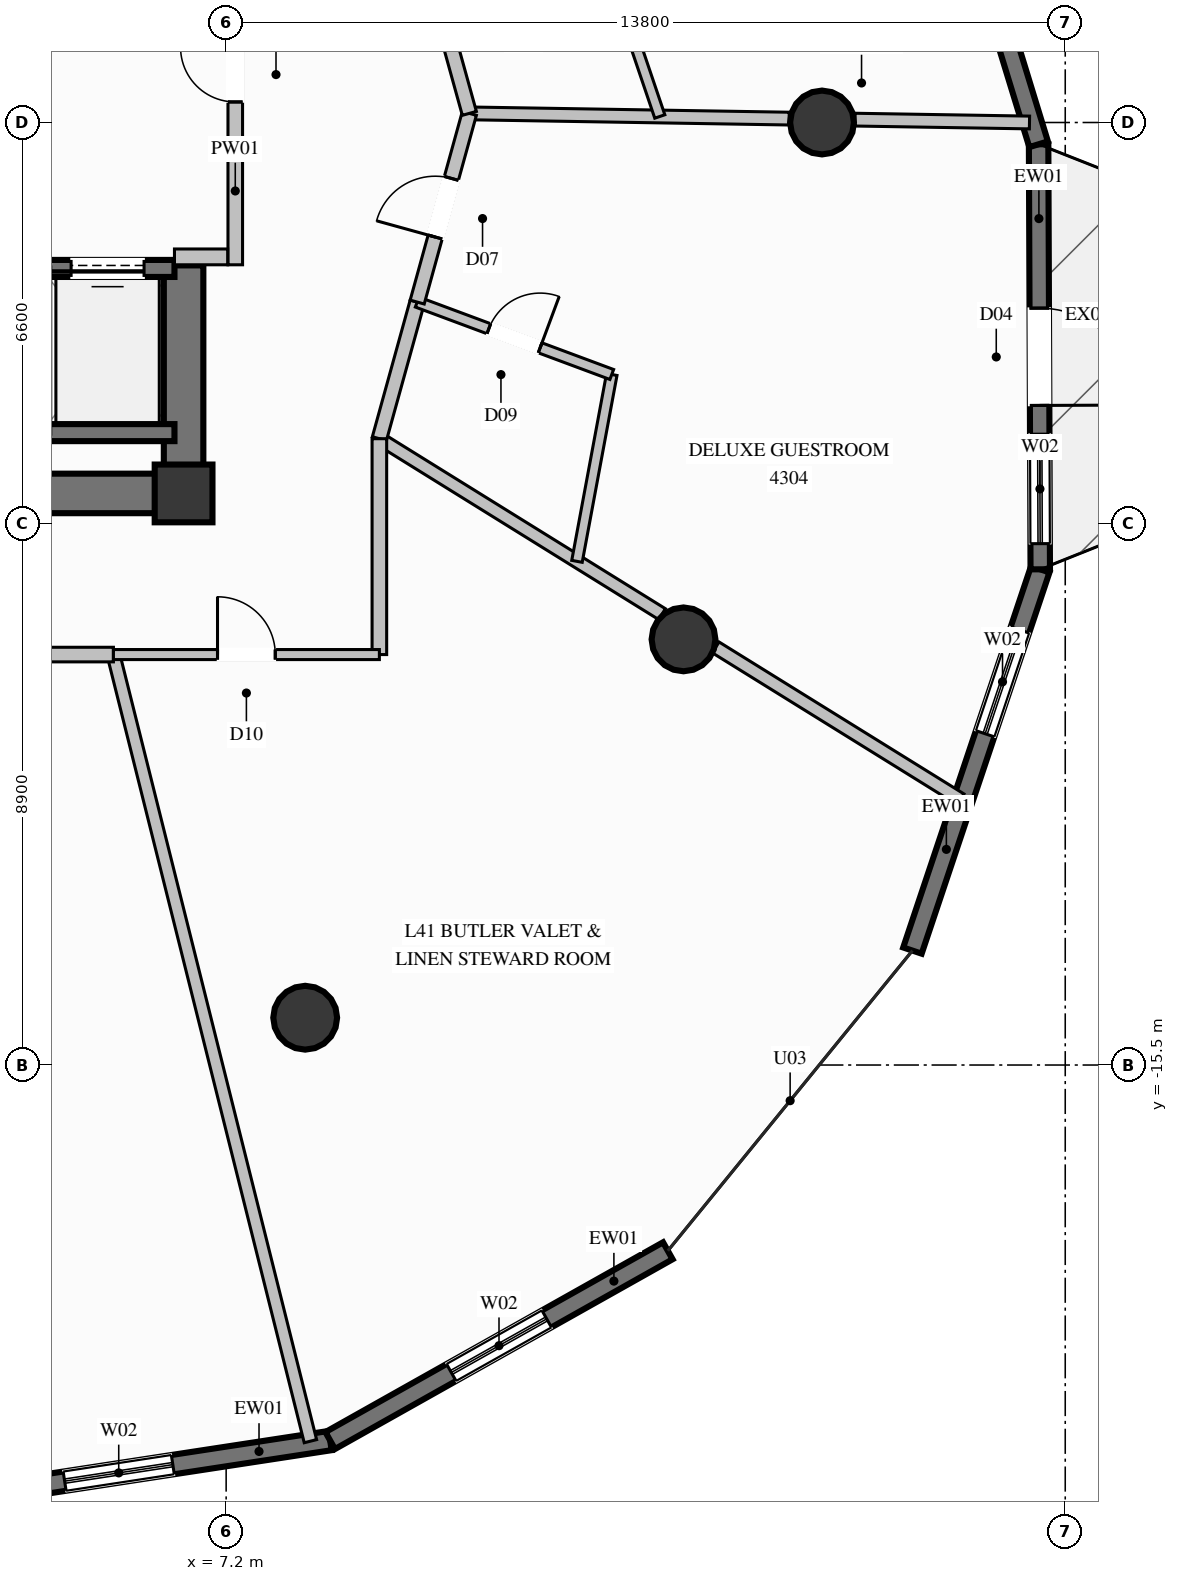
"""IFC4 building model, lengths in metres.
Left out: names, types, materials, properties, quantities, classifications, styles, units other than length and angle.
Written with IfcOpenShell. Run it as: python <this file> out.ifc"""

import sys

from ifc_helpers import new_model, si_unit, direction, frame, frame_2d, origin, origin_2d, place, context, subcontext, project, spatial, rectangle, circle, extrude, element, fill, save


model = new_model("IFC4")
c1 = context("Model", 3, precision=1e-05, world=origin(), true_north=direction((0.0, 1.0)))
c2 = subcontext(c1, "Body", "Model", "MODEL_VIEW")
j1 = project(units=[si_unit("LENGTHUNIT", "METRE"), si_unit("PLANEANGLEUNIT", "RADIAN")], contexts=[c1])
p1 = place(None, origin())
s1 = spatial("IfcSite", under=j1, at=p1, CompositionType="ELEMENT")
p2 = place(p1, origin())
s2 = spatial("IfcBuilding", under=s1, at=p2, CompositionType="ELEMENT")
p3 = place(p2, frame((0.0, 0.0, 160.2)))
s3 = spatial("IfcBuildingStorey", under=s2, at=p3, CompositionType="ELEMENT", Elevation=160.2)
p4 = place(p3, frame((6.5, -6.1, 0.0), z_axis=(0.0, 0.0, 1.0), x_axis=(1.0, 0.0, 0.0)))
e1 = element("IfcColumn", 1, at=p4, inside=s3, PredefinedType="COLUMN", context=c2, shape_type="SweptSolid", body=[
    extrude(rectangle(XDim=0.95, YDim=0.95, at=origin_2d()), origin(), (0.0, 0.0, 1.0), 3.6),
])
p5 = place(p3, frame((4.15, -6.1, 0.0), z_axis=(0.0, 0.0, 1.0), x_axis=(1.0, 0.0, 0.0)))
e2 = element("IfcWall", 2, at=p5, inside=s3, PredefinedType="SHEAR", context=c2, shape_type="SweptSolid", body=[
    extrude(rectangle(XDim=2.025, YDim=0.65, at=frame_2d((1.013, 0.0))), origin(), (0.0, 0.0, 1.0), 3.6),
])
p6 = place(p3, frame((6.5, -6.425, 0.0), z_axis=(0.0, 0.0, 1.0), x_axis=(0.0, 1.0, 0.0)))
e3 = element("IfcWall", 3, at=p6, inside=s3, PredefinedType="SHEAR", context=c2, shape_type="SweptSolid", body=[
    extrude(rectangle(XDim=4.075, YDim=0.65, at=frame_2d((2.038, 0.0))), origin(), (0.0, 0.0, 1.0), 3.6),
])
for number, where, z_axis, x_axis in (
    (4, (17.0, 0.0, 0.0), (0.0, 0.0, 1.0), (1.0, 0.0, 0.0)),
    (5, (8.5, -14.722, 0.0), (0.0, 0.0, 1.0), (1.0, 0.0, 0.0)),
    (6, (14.722, -8.5, 0.0), (0.0, 0.0, 1.0), (1.0, 0.0, 0.0)),
):
    element("IfcColumn", number, at=place(p3, frame(where, z_axis=z_axis, x_axis=x_axis)), inside=s3, PredefinedType="COLUMN", context=c2, shape_type="SweptSolid", body=[
        extrude(circle(Radius=0.525, at=origin_2d()), origin(), (0.0, 0.0, 1.0), 3.6),
    ])
p7 = place(p3, frame((20.589, -7.348, 0.0), z_axis=(0.0, 0.0, 1.0), x_axis=(-0.317866465999, -0.948135491264, 0.0)))
e7 = element("IfcWall", 7, at=p7, inside=s3, PredefinedType="SOLIDWALL", context=c2, shape_type="SweptSolid", body=[
    extrude(rectangle(XDim=6.613, YDim=0.32, at=frame_2d((3.307, 0.0))), origin(), (0.0, 0.0, 1.0), 3.2),
])
p8 = place(p7, frame((1.052, 0.0, 0.35)))
e8 = element("IfcOpeningElement", 8, at=p8, cuts=e7, PredefinedType="OPENING", context=c2, shape_type="SweptSolid", body=[
    extrude(rectangle(XDim=1.8, YDim=2.6, at=frame_2d((0.9, 1.3))), frame((0.0, 0.17, 0.0), z_axis=(0.0, -1.0, 0.0), x_axis=(1.0, 0.0, 0.0)), (0.0, 0.0, 1.0), 0.34),
])
p9 = place(p3, frame((20.562, -0.358, 0.0), z_axis=(0.0, 0.0, 1.0), x_axis=(0.003876887493, -0.999992484843, 0.0)))
e9 = element("IfcWall", 9, at=p9, inside=s3, PredefinedType="SOLIDWALL", context=c2, shape_type="SweptSolid", body=[
    extrude(rectangle(XDim=6.99, YDim=0.32, at=frame_2d((3.495, 0.0))), origin(), (0.0, 0.0, 1.0), 3.2),
])
p10 = place(p9, frame((4.768, 0.0, 0.35)))
e10 = element("IfcOpeningElement", 10, at=p10, cuts=e9, PredefinedType="OPENING", context=c2, shape_type="SweptSolid", body=[
    extrude(rectangle(XDim=1.8, YDim=2.6, at=frame_2d((0.9, 1.3))), frame((0.0, 0.17, 0.0), z_axis=(0.0, -1.0, 0.0), x_axis=(1.0, 0.0, 0.0)), (0.0, 0.0, 1.0), 0.34),
])
p11 = place(p9, frame((2.695, 0.0, 0.0)))
e11 = element("IfcOpeningElement", 11, at=p11, cuts=e9, PredefinedType="OPENING", context=c2, shape_type="SweptSolid", body=[
    extrude(rectangle(XDim=1.6, YDim=2.3, at=frame_2d((0.8, 1.15))), frame((0.0, 0.17, 0.0), z_axis=(0.0, -1.0, 0.0), x_axis=(1.0, 0.0, 0.0)), (0.0, 0.0, 1.0), 0.34),
])
p12 = place(p3, frame((18.411, 6.666, 0.0), z_axis=(0.0, 0.0, 1.0), x_axis=(0.292831477481, -0.956164068451, 0.0)))
e12 = element("IfcWall", 12, at=p12, inside=s3, PredefinedType="SOLIDWALL", context=c2, shape_type="SweptSolid", body=[
    extrude(rectangle(XDim=7.346, YDim=0.32, at=frame_2d((3.673, 0.0))), origin(), (0.0, 0.0, 1.0), 3.2),
])
p13 = place(p12, frame((2.53, 0.0, 0.35)))
e13 = element("IfcOpeningElement", 13, at=p13, cuts=e12, PredefinedType="OPENING", context=c2, shape_type="SweptSolid", body=[
    extrude(rectangle(XDim=1.8, YDim=2.6, at=frame_2d((0.9, 1.3))), frame((0.0, 0.17, 0.0), z_axis=(0.0, -1.0, 0.0), x_axis=(1.0, 0.0, 0.0)), (0.0, 0.0, 1.0), 0.34),
])
p14 = place(p3, frame((8.911, -21.676, 0.0), z_axis=(0.0, 0.0, 1.0), x_axis=(-0.988522302644, -0.151075005132, 0.0)))
e14 = element("IfcWall", 14, at=p14, inside=s3, PredefinedType="SOLIDWALL", context=c2, shape_type="SweptSolid", body=[
    extrude(rectangle(XDim=6.613, YDim=0.32, at=frame_2d((3.306, 0.0))), origin(), (0.0, 0.0, 1.0), 3.2),
])
p15 = place(p14, frame((2.618, 0.0, 0.35)))
e15 = element("IfcOpeningElement", 15, at=p15, cuts=e14, PredefinedType="OPENING", context=c2, shape_type="SweptSolid", body=[
    extrude(rectangle(XDim=1.8, YDim=2.6, at=frame_2d((0.9, 1.3))), frame((0.0, 0.17, 0.0), z_axis=(0.0, -1.0, 0.0), x_axis=(1.0, 0.0, 0.0)), (0.0, 0.0, 1.0), 0.34),
])
p16 = place(p3, frame((14.464, -18.555, 0.0), z_axis=(0.0, 0.0, 1.0), x_axis=(-0.871749481809, -0.489951876174, 0.0)))
e16 = element("IfcWall", 16, at=p16, inside=s3, PredefinedType="SOLIDWALL", context=c2, shape_type="SweptSolid", body=[
    extrude(rectangle(XDim=6.37, YDim=0.32, at=frame_2d((3.185, 0.0))), origin(), (0.0, 0.0, 1.0), 3.2),
])
p17 = place(p16, frame((2.285, 0.0, 0.35)))
e17 = element("IfcOpeningElement", 17, at=p17, cuts=e16, PredefinedType="OPENING", context=c2, shape_type="SweptSolid", body=[
    extrude(rectangle(XDim=1.8, YDim=2.6, at=frame_2d((0.9, 1.3))), frame((0.0, 0.17, 0.0), z_axis=(0.0, -1.0, 0.0), x_axis=(1.0, 0.0, 0.0)), (0.0, 0.0, 1.0), 0.34),
])
p18 = place(p3, frame((4.15, -5.1, 0.0), z_axis=(0.0, 0.0, 1.0), x_axis=(1.0, 0.0, 0.0)))
e18 = element("IfcWall", 18, at=p18, inside=s3, PredefinedType="SOLIDWALL", context=c2, shape_type="SweptSolid", body=[
    extrude(rectangle(XDim=2.2, YDim=0.28, at=frame_2d((1.1, 0.0))), origin(), (0.0, 0.0, 1.0), 3.2),
])
p19 = place(p3, frame((6.35, -2.4, 0.0), z_axis=(0.0, 0.0, 1.0), x_axis=(-1.0, 0.0, 0.0)))
e19 = element("IfcWall", 19, at=p19, inside=s3, PredefinedType="SOLIDWALL", context=c2, shape_type="SweptSolid", body=[
    extrude(rectangle(XDim=2.2, YDim=0.28, at=frame_2d((1.1, 0.0))), origin(), (0.0, 0.0, 1.0), 3.2),
])
p20 = place(p19, frame((0.5, 0.0, 0.0)))
e20 = element("IfcOpeningElement", 20, at=p20, cuts=e19, PredefinedType="OPENING", context=c2, shape_type="SweptSolid", body=[
    extrude(rectangle(XDim=1.2, YDim=2.2, at=frame_2d((0.6, 1.1))), frame((0.0, 0.15, 0.0), z_axis=(0.0, -1.0, 0.0), x_axis=(1.0, 0.0, 0.0)), (0.0, 0.0, 1.0), 0.3),
])
p21 = place(p3, frame((7.35, -2.34, 0.0), z_axis=(0.0, 0.0, 1.0), x_axis=(0.0, 1.0, 0.0)))
e21 = element("IfcWall", 21, at=p21, inside=s3, PredefinedType="PARTITIONING", context=c2, shape_type="SweptSolid", body=[
    extrude(rectangle(XDim=5.02, YDim=0.24, at=frame_2d((2.51, 0.0))), origin(), (0.0, 0.0, 1.0), 3.2),
])
p22 = place(p21, frame((2.678, 0.0, 0.0)))
e22 = element("IfcOpeningElement", 22, at=p22, cuts=e21, PredefinedType="OPENING", context=c2, shape_type="SweptSolid", body=[
    extrude(rectangle(XDim=0.9, YDim=2.02, at=frame_2d((0.45, 1.01))), frame((0.0, 0.13, 0.0), z_axis=(0.0, -1.0, 0.0), x_axis=(1.0, 0.0, 0.0)), (0.0, 0.0, 1.0), 0.26),
])
p23 = place(p3, frame((6.35, -2.21, 0.0), z_axis=(0.0, 0.0, 1.0), x_axis=(1.0, 0.0, 0.0)))
e23 = element("IfcWall", 23, at=p23, inside=s3, PredefinedType="PARTITIONING", context=c2, shape_type="SweptSolid", body=[
    extrude(rectangle(XDim=0.875, YDim=0.26, at=frame_2d((0.438, 0.0))), origin(), (0.0, 0.0, 1.0), 3.2),
])
p24 = place(p3, frame((11.2, 0.15, 0.0), z_axis=(0.0, 0.0, 1.0), x_axis=(0.999866513716, -0.016338749957, 0.0)))
e24 = element("IfcWall", 24, at=p24, inside=s3, PredefinedType="PARTITIONING", context=c2, shape_type="SweptSolid", body=[
    extrude(rectangle(XDim=5.26, YDim=0.21, at=frame_2d((2.63, 0.0))), origin(), (0.0, 0.0, 1.0), 2.067),
])
p25 = place(p3, frame((17.543, 0.047, 0.0), z_axis=(0.0, 0.0, 1.0), x_axis=(0.999865174134, -0.016420522346, 0.0)))
e25 = element("IfcWall", 25, at=p25, inside=s3, PredefinedType="PARTITIONING", context=c2, shape_type="SweptSolid", body=[
    extrude(rectangle(XDim=2.87, YDim=0.21, at=frame_2d((1.435, 0.0))), origin(), (0.0, 0.0, 1.0), 3.2),
])
p26 = place(p3, frame((9.72, -5.2, 0.0), z_axis=(0.0, 0.0, 1.0), x_axis=(0.849683597514, -0.527292882671, 0.0)))
e26 = element("IfcWall", 26, at=p26, inside=s3, PredefinedType="PARTITIONING", context=c2, shape_type="SweptSolid", body=[
    extrude(rectangle(XDim=5.471, YDim=0.21, at=frame_2d((2.736, 0.0))), origin(), (0.0, 0.0, 1.0), 2.067),
])
p27 = place(p3, frame((15.251, -8.632, 0.0), z_axis=(0.0, 0.0, 1.0), x_axis=(0.849749962153, -0.527185927184, 0.0)))
e27 = element("IfcWall", 27, at=p27, inside=s3, PredefinedType="PARTITIONING", context=c2, shape_type="SweptSolid", body=[
    extrude(rectangle(XDim=4.74, YDim=0.21, at=frame_2d((2.37, 0.0))), origin(), (0.0, 0.0, 1.0), 3.2),
])
p28 = place(p3, frame((9.72, -5.2, 0.0), z_axis=(0.0, 0.0, 1.0), x_axis=(0.266801280383, 0.963751563831, 0.0)))
e28 = element("IfcWall", 28, at=p28, inside=s3, PredefinedType="PARTITIONING", context=c2, shape_type="SweptSolid", body=[
    extrude(rectangle(XDim=2.332, YDim=0.24, at=frame_2d((1.166, 0.0))), origin(), (0.0, 0.0, 1.0), 3.2),
])
p29 = place(p3, frame((12.97, -7.217, 0.0), z_axis=(0.0, 0.0, 1.0), x_axis=(0.183000964093, 0.983112733689, 0.0)))
e29 = element("IfcWall", 29, at=p29, inside=s3, PredefinedType="PLUMBINGWALL", context=c2, shape_type="SweptSolid", body=[
    extrude(rectangle(XDim=3.126, YDim=0.175, at=frame_2d((1.563, 0.0))), origin(), (0.0, 0.0, 1.0), 3.2),
])
p30 = place(p3, frame((10.342, -2.953, 0.0), z_axis=(0.0, 0.0, 1.0), x_axis=(0.937175646821, -0.348857860749, 0.0)))
e30 = element("IfcWall", 30, at=p30, inside=s3, PredefinedType="PLUMBINGWALL", context=c2, shape_type="SweptSolid", body=[
    extrude(rectangle(XDim=3.415, YDim=0.175, at=frame_2d((1.707, 0.0))), origin(), (0.0, 0.0, 1.0), 3.2),
])
p31 = place(p30, frame((1.257, 0.0, 0.0)))
e31 = element("IfcOpeningElement", 31, at=p31, cuts=e30, PredefinedType="OPENING", context=c2, shape_type="SweptSolid", body=[
    extrude(rectangle(XDim=0.9, YDim=2.1, at=frame_2d((0.45, 1.05))), frame((0.0, 0.098, 0.0), z_axis=(0.0, -1.0, 0.0), x_axis=(1.0, 0.0, 0.0)), (0.0, 0.0, 1.0), 0.195),
])
p32 = place(p3, frame((10.342, -2.953, 0.0), z_axis=(0.0, 0.0, 1.0), x_axis=(0.266497617314, 0.963835577246, 0.0)))
e32 = element("IfcWall", 32, at=p32, inside=s3, PredefinedType="PARTITIONING", context=c2, shape_type="SweptSolid", body=[
    extrude(rectangle(XDim=3.219, YDim=0.24, at=frame_2d((1.61, 0.0))), origin(), (0.0, 0.0, 1.0), 3.2),
])
p33 = place(p32, frame((1.11, 0.0, 0.0)))
e33 = element("IfcOpeningElement", 33, at=p33, cuts=e32, PredefinedType="OPENING", context=c2, shape_type="SweptSolid", body=[
    extrude(rectangle(XDim=1.0, YDim=2.2, at=frame_2d((0.5, 1.1))), frame((0.0, 0.13, 0.0), z_axis=(0.0, -1.0, 0.0), x_axis=(1.0, 0.0, 0.0)), (0.0, 0.0, 1.0), 0.26),
])
p34 = place(p3, frame((11.2, 0.15, 0.0), z_axis=(0.0, 0.0, 1.0), x_axis=(-0.266801280383, 0.963751563831, 0.0)))
e34 = element("IfcWall", 34, at=p34, inside=s3, PredefinedType="PARTITIONING", context=c2, shape_type="SweptSolid", body=[
    extrude(rectangle(XDim=2.332, YDim=0.24, at=frame_2d((1.166, 0.0))), origin(), (0.0, 0.0, 1.0), 3.2),
])
p35 = place(p3, frame((14.332, 0.099, 0.0), z_axis=(0.0, 0.0, 1.0), x_axis=(-0.32114672857, 0.947029449769, 0.0)))
e35 = element("IfcWall", 35, at=p35, inside=s3, PredefinedType="PLUMBINGWALL", context=c2, shape_type="SweptSolid", body=[
    extrude(rectangle(XDim=3.005, YDim=0.175, at=frame_2d((1.502, 0.0))), origin(), (0.0, 0.0, 1.0), 3.2),
])
p36 = place(p3, frame((5.346, -8.75, 0.0), z_axis=(0.0, 0.0, 1.0), x_axis=(0.242957749605, -0.970036871416, 0.0)))
e36 = element("IfcWall", 36, at=p36, inside=s3, PredefinedType="PARTITIONING", context=c2, shape_type="SweptSolid", body=[
    extrude(rectangle(XDim=13.336, YDim=0.21, at=frame_2d((6.668, 0.0))), origin(), (0.0, 0.0, 1.0), 2.067),
])
p37 = place(p3, frame((0.0, -8.75, 0.0), z_axis=(0.0, 0.0, 1.0), x_axis=(1.0, 0.0, 0.0)))
e37 = element("IfcWall", 37, at=p37, inside=s3, PredefinedType="PARTITIONING", context=c2, shape_type="SweptSolid", body=[
    extrude(rectangle(XDim=5.346, YDim=0.24, at=frame_2d((2.673, 0.0))), origin(), (0.0, 0.0, 1.0), 3.2),
])
p38 = place(p37, frame((2.173, 0.0, 0.0)))
e38 = element("IfcOpeningElement", 38, at=p38, cuts=e37, PredefinedType="OPENING", context=c2, shape_type="SweptSolid", body=[
    extrude(rectangle(XDim=1.0, YDim=2.2, at=frame_2d((0.5, 1.1))), frame((0.0, 0.13, 0.0), z_axis=(0.0, -1.0, 0.0), x_axis=(1.0, 0.0, 0.0)), (0.0, 0.0, 1.0), 0.26),
])
p39 = place(p3, frame((9.72, -8.75, 0.0), z_axis=(0.0, 0.0, 1.0), x_axis=(0.0, 1.0, 0.0)))
e39 = element("IfcWall", 39, at=p39, inside=s3, PredefinedType="PARTITIONING", context=c2, shape_type="SweptSolid", body=[
    extrude(rectangle(XDim=3.55, YDim=0.24, at=frame_2d((1.775, 0.0))), origin(), (0.0, 0.0, 1.0), 3.2),
])
p40 = place(p3, frame((5.346, -8.75, 0.0), z_axis=(0.0, 0.0, 1.0), x_axis=(1.0, 0.0, 0.0)))
e40 = element("IfcWall", 40, at=p40, inside=s3, PredefinedType="PARTITIONING", context=c2, shape_type="SweptSolid", body=[
    extrude(rectangle(XDim=4.374, YDim=0.165, at=frame_2d((2.187, 0.0))), origin(), (0.0, 0.0, 1.0), 3.2),
])
p41 = place(p40, frame((1.712, 0.0, 0.0)))
e41 = element("IfcOpeningElement", 41, at=p41, cuts=e40, PredefinedType="OPENING", context=c2, shape_type="SweptSolid", body=[
    extrude(rectangle(XDim=0.95, YDim=2.1, at=frame_2d((0.475, 1.05))), frame((0.0, 0.093, 0.0), z_axis=(0.0, -1.0, 0.0), x_axis=(1.0, 0.0, 0.0)), (0.0, 0.0, 1.0), 0.185),
])
p42 = place(p8, origin())
e42 = element("IfcWindow", 42, at=p42, inside=s3, PartitioningType="SINGLE_PANEL", PredefinedType="WINDOW", context=c2, shape_type="SweptSolid", body=[
    extrude(rectangle(XDim=1.8, YDim=2.6, at=frame_2d((0.9, 1.3))), frame((0.0, 0.03, 0.0), z_axis=(0.0, -1.0, 0.0), x_axis=(1.0, 0.0, 0.0)), (0.0, 0.0, 1.0), 0.06),
])
fill(e8, e42)
p43 = place(p10, origin())
e43 = element("IfcWindow", 43, at=p43, inside=s3, PartitioningType="SINGLE_PANEL", PredefinedType="WINDOW", context=c2, shape_type="SweptSolid", body=[
    extrude(rectangle(XDim=1.8, YDim=2.6, at=frame_2d((0.9, 1.3))), frame((0.0, 0.03, 0.0), z_axis=(0.0, -1.0, 0.0), x_axis=(1.0, 0.0, 0.0)), (0.0, 0.0, 1.0), 0.06),
])
fill(e10, e43)
p44 = place(p11, origin())
e44 = element("IfcDoor", 44, at=p44, inside=s3, OperationType="SINGLE_SWING_RIGHT", PredefinedType="DOOR", context=c2, shape_type="SweptSolid", body=[
    extrude(rectangle(XDim=1.6, YDim=2.3, at=frame_2d((0.8, 1.15))), frame((0.0, 0.025, 0.0), z_axis=(0.0, -1.0, 0.0), x_axis=(1.0, 0.0, 0.0)), (0.0, 0.0, 1.0), 0.05),
])
fill(e11, e44)
p45 = place(p15, origin())
e45 = element("IfcWindow", 45, at=p45, inside=s3, PartitioningType="SINGLE_PANEL", PredefinedType="WINDOW", context=c2, shape_type="SweptSolid", body=[
    extrude(rectangle(XDim=1.8, YDim=2.6, at=frame_2d((0.9, 1.3))), frame((0.0, 0.03, 0.0), z_axis=(0.0, -1.0, 0.0), x_axis=(1.0, 0.0, 0.0)), (0.0, 0.0, 1.0), 0.06),
])
fill(e15, e45)
p46 = place(p17, origin())
e46 = element("IfcWindow", 46, at=p46, inside=s3, PartitioningType="SINGLE_PANEL", PredefinedType="WINDOW", context=c2, shape_type="SweptSolid", body=[
    extrude(rectangle(XDim=1.8, YDim=2.6, at=frame_2d((0.9, 1.3))), frame((0.0, 0.03, 0.0), z_axis=(0.0, -1.0, 0.0), x_axis=(1.0, 0.0, 0.0)), (0.0, 0.0, 1.0), 0.06),
])
fill(e17, e46)
p47 = place(p20, origin())
e47 = element("IfcDoor", 47, at=p47, inside=s3, OperationType="SLIDING_TO_LEFT", PredefinedType="DOOR", context=c2, shape_type="SweptSolid", body=[
    extrude(rectangle(XDim=1.2, YDim=2.2, at=frame_2d((0.6, 1.1))), frame((0.0, 0.025, 0.0), z_axis=(0.0, -1.0, 0.0), x_axis=(1.0, 0.0, 0.0)), (0.0, 0.0, 1.0), 0.05),
])
fill(e20, e47)
p48 = place(p22, origin())
e48 = element("IfcDoor", 48, at=p48, inside=s3, OperationType="SINGLE_SWING_RIGHT", PredefinedType="DOOR", context=c2, shape_type="SweptSolid", body=[
    extrude(rectangle(XDim=0.9, YDim=2.02, at=frame_2d((0.45, 1.01))), frame((0.0, 0.025, 0.0), z_axis=(0.0, -1.0, 0.0), x_axis=(1.0, 0.0, 0.0)), (0.0, 0.0, 1.0), 0.05),
])
fill(e22, e48)
p49 = place(p31, origin())
e49 = element("IfcDoor", 49, at=p49, inside=s3, OperationType="SINGLE_SWING_RIGHT", PredefinedType="DOOR", context=c2, shape_type="SweptSolid", body=[
    extrude(rectangle(XDim=0.9, YDim=2.1, at=frame_2d((0.45, 1.05))), frame((0.0, 0.025, 0.0), z_axis=(0.0, -1.0, 0.0), x_axis=(1.0, 0.0, 0.0)), (0.0, 0.0, 1.0), 0.05),
])
fill(e31, e49)
p50 = place(p33, origin())
e50 = element("IfcDoor", 50, at=p50, inside=s3, OperationType="SINGLE_SWING_LEFT", PredefinedType="DOOR", context=c2, shape_type="SweptSolid", body=[
    extrude(rectangle(XDim=1.0, YDim=2.2, at=frame_2d((0.5, 1.1))), frame((0.0, 0.025, 0.0), z_axis=(0.0, -1.0, 0.0), x_axis=(1.0, 0.0, 0.0)), (0.0, 0.0, 1.0), 0.05),
])
fill(e33, e50)
p51 = place(p41, origin())
e51 = element("IfcDoor", 51, at=p51, inside=s3, OperationType="SINGLE_SWING_LEFT", PredefinedType="DOOR", context=c2, shape_type="SweptSolid", body=[
    extrude(rectangle(XDim=0.95, YDim=2.1, at=frame_2d((0.475, 1.05))), frame((0.0, 0.025, 0.0), z_axis=(0.0, -1.0, 0.0), x_axis=(1.0, 0.0, 0.0)), (0.0, 0.0, 1.0), 0.05),
])
fill(e41, e51)
save(model, sys.argv[1])
